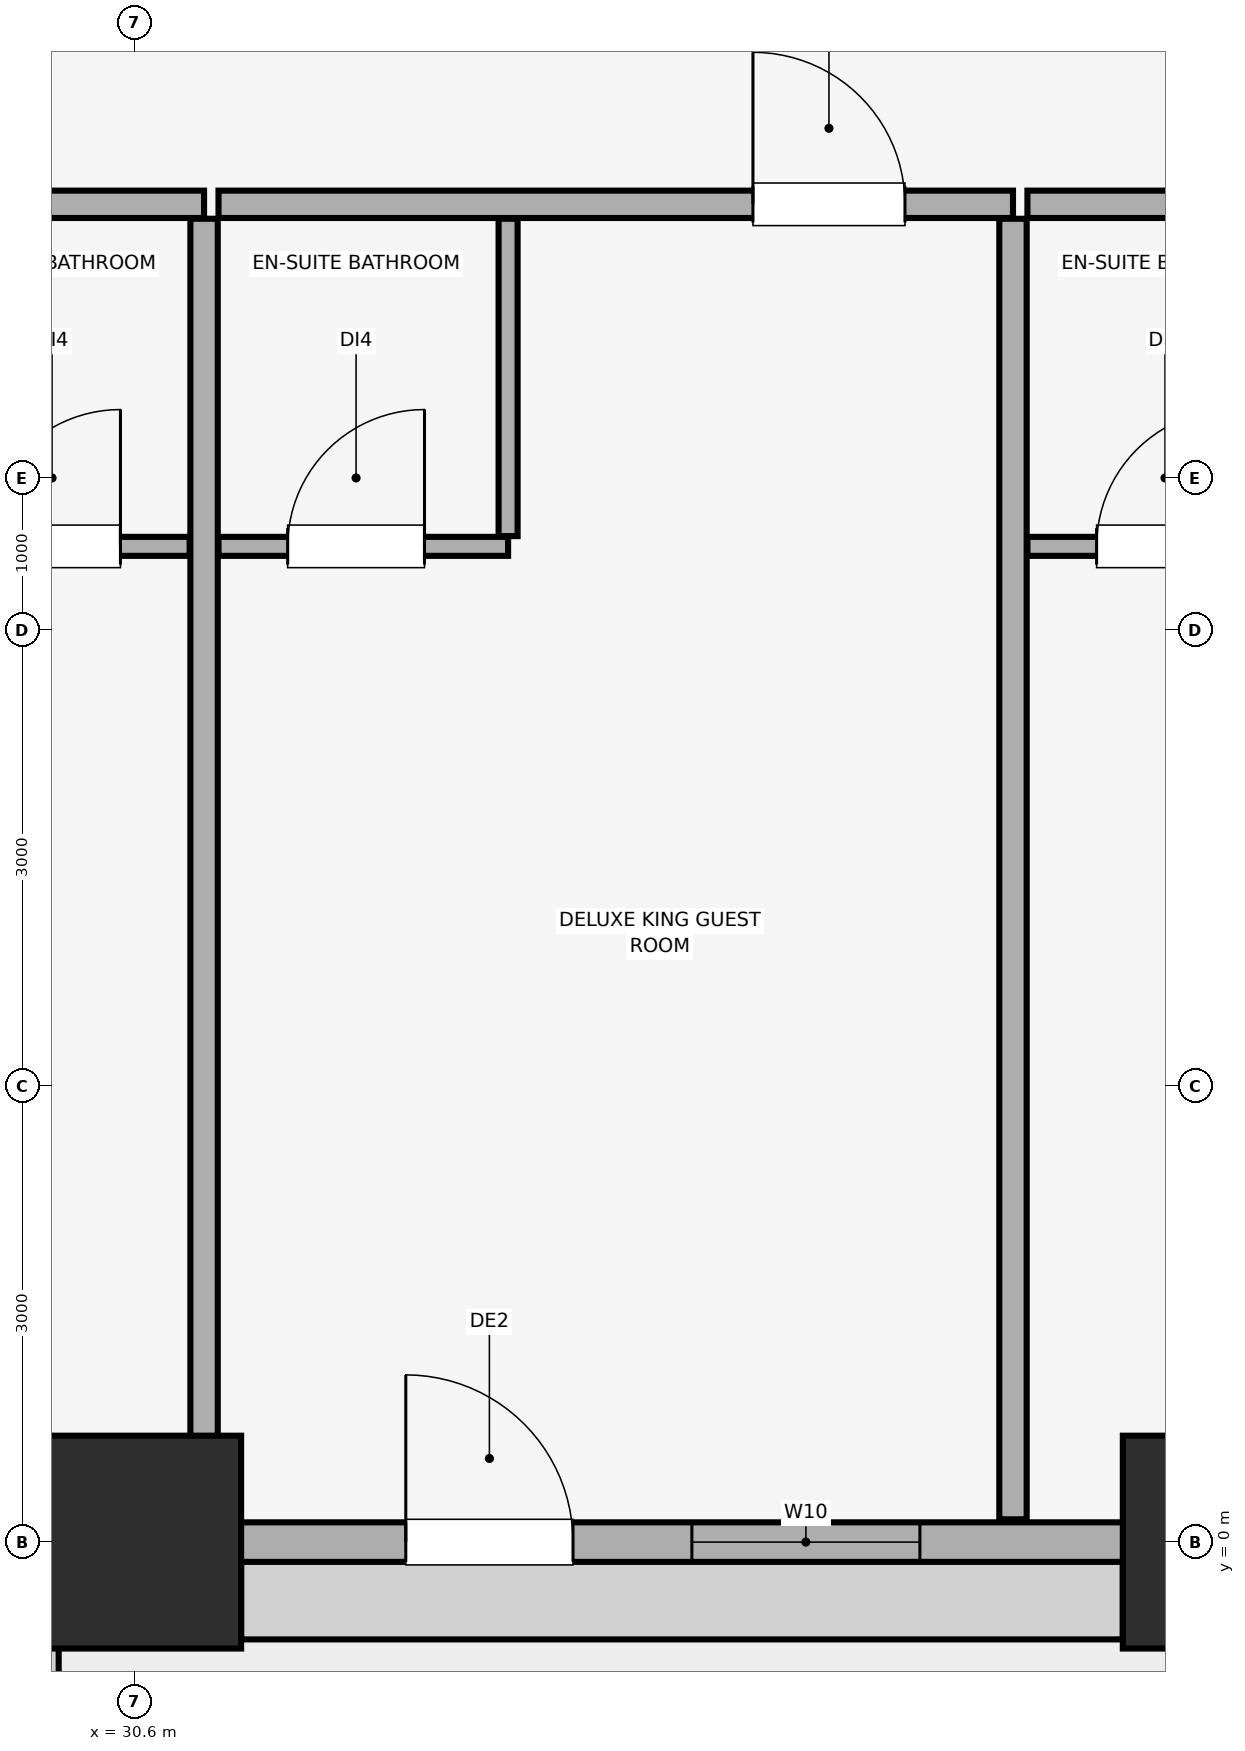
"""IFC4 building model, lengths in metres.
Left out: names, types, materials, properties, quantities, classifications, styles, units other than length and angle.
Written with IfcOpenShell. Run it as: python <this file> out.ifc"""

import sys

from ifc_helpers import new_model, si_unit, direction, frame, frame_2d, origin, origin_2d, place, context, subcontext, project, spatial, rectangle, extrude, element, fill, save


model = new_model("IFC4")
c1 = context("Model", 3, precision=1e-05, world=origin(), true_north=direction((0.0, 1.0)))
c2 = subcontext(c1, "Body", "Model", "MODEL_VIEW")
j1 = project(units=[si_unit("LENGTHUNIT", "METRE"), si_unit("PLANEANGLEUNIT", "RADIAN")], contexts=[c1])
p1 = place(None, origin())
s1 = spatial("IfcSite", under=j1, at=p1, CompositionType="ELEMENT")
p2 = place(p1, origin())
s2 = spatial("IfcBuilding", under=s1, at=p2, CompositionType="ELEMENT")
p3 = place(p2, frame((0.0, 0.0, 31.4)))
s3 = spatial("IfcBuildingStorey", under=s2, at=p3, CompositionType="ELEMENT", Elevation=31.4)
for number, where, z_axis, x_axis in (
    (1, (30.6, 0.0, 0.0), (0.0, 0.0, 1.0), (1.0, 0.0, 0.0)),
    (2, (37.8, 0.0, 0.0), (0.0, 0.0, 1.0), (1.0, 0.0, 0.0)),
):
    element("IfcColumn", number, at=place(p3, frame(where, z_axis=z_axis, x_axis=x_axis)), inside=s3, PredefinedType="COLUMN", context=c2, shape_type="SweptSolid", body=[
        extrude(rectangle(XDim=1.4, YDim=1.4, at=origin_2d()), origin(), (0.0, 0.0, 1.0), 3.51),
    ])
p4 = place(p3, frame((4.2, 0.0, 0.0), z_axis=(0.0, 0.0, 1.0), x_axis=(1.0, 0.0, 0.0)))
e3 = element("IfcWall", 3, at=p4, inside=s3, PredefinedType="SOLIDWALL", context=c2, shape_type="SweptSolid", body=[
    extrude(rectangle(XDim=75.6, YDim=0.26, at=frame_2d((37.8, 0.0))), origin(), (0.0, 0.0, 1.0), 2.56),
])
p5 = place(p4, frame((13.517, 0.0, 0.0)))
e4 = element("IfcOpeningElement", 4, at=p5, cuts=e3, PredefinedType="OPENING", context=c2, shape_type="SweptSolid", body=[
    extrude(rectangle(XDim=1.1, YDim=2.15, at=frame_2d((0.55, 1.075))), frame((0.0, 0.14, 0.0), z_axis=(0.0, -1.0, 0.0), x_axis=(1.0, 0.0, 0.0)), (0.0, 0.0, 1.0), 0.28),
])
p6 = place(p4, frame((28.183, 0.0, 0.0)))
e5 = element("IfcOpeningElement", 5, at=p6, cuts=e3, PredefinedType="OPENING", context=c2, shape_type="SweptSolid", body=[
    extrude(rectangle(XDim=1.1, YDim=2.15, at=frame_2d((0.55, 1.075))), frame((0.0, 0.14, 0.0), z_axis=(0.0, -1.0, 0.0), x_axis=(1.0, 0.0, 0.0)), (0.0, 0.0, 1.0), 0.28),
])
p7 = place(p4, frame((60.983, 0.0, 0.0)))
e6 = element("IfcOpeningElement", 6, at=p7, cuts=e3, PredefinedType="OPENING", context=c2, shape_type="SweptSolid", body=[
    extrude(rectangle(XDim=1.1, YDim=2.15, at=frame_2d((0.55, 1.075))), frame((0.0, 0.14, 0.0), z_axis=(0.0, -1.0, 0.0), x_axis=(1.0, 0.0, 0.0)), (0.0, 0.0, 1.0), 0.28),
])
p8 = place(p4, frame((1.035, 0.0, 0.85)))
e7 = element("IfcOpeningElement", 7, at=p8, cuts=e3, PredefinedType="OPENING", context=c2, shape_type="SweptSolid", body=[
    extrude(rectangle(XDim=2.4, YDim=1.5, at=frame_2d((1.2, 0.75))), frame((0.0, 0.14, 0.0), z_axis=(0.0, -1.0, 0.0), x_axis=(1.0, 0.0, 0.0)), (0.0, 0.0, 1.0), 0.28),
])
p9 = place(p4, frame((7.031, 0.0, 0.85)))
e8 = element("IfcOpeningElement", 8, at=p9, cuts=e3, PredefinedType="OPENING", context=c2, shape_type="SweptSolid", body=[
    extrude(rectangle(XDim=2.4, YDim=1.5, at=frame_2d((1.2, 0.75))), frame((0.0, 0.14, 0.0), z_axis=(0.0, -1.0, 0.0), x_axis=(1.0, 0.0, 0.0)), (0.0, 0.0, 1.0), 0.28),
])
p10 = place(p4, frame((16.757, 0.0, 0.85)))
e9 = element("IfcOpeningElement", 9, at=p10, cuts=e3, PredefinedType="OPENING", context=c2, shape_type="SweptSolid", body=[
    extrude(rectangle(XDim=1.5, YDim=1.4, at=frame_2d((0.75, 0.7))), frame((0.0, 0.14, 0.0), z_axis=(0.0, -1.0, 0.0), x_axis=(1.0, 0.0, 0.0)), (0.0, 0.0, 1.0), 0.28),
])
p11 = place(p4, frame((22.567, 0.0, 0.85)))
e10 = element("IfcOpeningElement", 10, at=p11, cuts=e3, PredefinedType="OPENING", context=c2, shape_type="SweptSolid", body=[
    extrude(rectangle(XDim=2.4, YDim=1.5, at=frame_2d((1.2, 0.75))), frame((0.0, 0.14, 0.0), z_axis=(0.0, -1.0, 0.0), x_axis=(1.0, 0.0, 0.0)), (0.0, 0.0, 1.0), 0.28),
])
p12 = place(p4, frame((30.065, 0.0, 0.85)))
e11 = element("IfcOpeningElement", 11, at=p12, cuts=e3, PredefinedType="OPENING", context=c2, shape_type="SweptSolid", body=[
    extrude(rectangle(XDim=1.5, YDim=1.4, at=frame_2d((0.75, 0.7))), frame((0.0, 0.14, 0.0), z_axis=(0.0, -1.0, 0.0), x_axis=(1.0, 0.0, 0.0)), (0.0, 0.0, 1.0), 0.28),
])
p13 = place(p4, frame((34.55, 0.0, 0.85)))
e12 = element("IfcOpeningElement", 12, at=p13, cuts=e3, PredefinedType="OPENING", context=c2, shape_type="SweptSolid", body=[
    extrude(rectangle(XDim=2.4, YDim=1.5, at=frame_2d((1.2, 0.75))), frame((0.0, 0.14, 0.0), z_axis=(0.0, -1.0, 0.0), x_axis=(1.0, 0.0, 0.0)), (0.0, 0.0, 1.0), 0.28),
])
p14 = place(p4, frame((38.35, 0.0, 0.85)))
e13 = element("IfcOpeningElement", 13, at=p14, cuts=e3, PredefinedType="OPENING", context=c2, shape_type="SweptSolid", body=[
    extrude(rectangle(XDim=2.4, YDim=1.5, at=frame_2d((1.2, 0.75))), frame((0.0, 0.14, 0.0), z_axis=(0.0, -1.0, 0.0), x_axis=(1.0, 0.0, 0.0)), (0.0, 0.0, 1.0), 0.28),
])
p15 = place(p4, frame((44.281, 0.0, 0.85)))
e14 = element("IfcOpeningElement", 14, at=p15, cuts=e3, PredefinedType="OPENING", context=c2, shape_type="SweptSolid", body=[
    extrude(rectangle(XDim=2.4, YDim=1.5, at=frame_2d((1.2, 0.75))), frame((0.0, 0.14, 0.0), z_axis=(0.0, -1.0, 0.0), x_axis=(1.0, 0.0, 0.0)), (0.0, 0.0, 1.0), 0.28),
])
p16 = place(p4, frame((50.332, 0.0, 0.85)))
e15 = element("IfcOpeningElement", 15, at=p16, cuts=e3, PredefinedType="OPENING", context=c2, shape_type="SweptSolid", body=[
    extrude(rectangle(XDim=2.4, YDim=1.5, at=frame_2d((1.2, 0.75))), frame((0.0, 0.14, 0.0), z_axis=(0.0, -1.0, 0.0), x_axis=(1.0, 0.0, 0.0)), (0.0, 0.0, 1.0), 0.28),
])
p17 = place(p4, frame((53.981, 0.0, 0.85)))
e16 = element("IfcOpeningElement", 16, at=p17, cuts=e3, PredefinedType="OPENING", context=c2, shape_type="SweptSolid", body=[
    extrude(rectangle(XDim=1.5, YDim=1.4, at=frame_2d((0.75, 0.7))), frame((0.0, 0.14, 0.0), z_axis=(0.0, -1.0, 0.0), x_axis=(1.0, 0.0, 0.0)), (0.0, 0.0, 1.0), 0.28),
])
p18 = place(p4, frame((64.759, 0.0, 0.85)))
e17 = element("IfcOpeningElement", 17, at=p18, cuts=e3, PredefinedType="OPENING", context=c2, shape_type="SweptSolid", body=[
    extrude(rectangle(XDim=1.5, YDim=1.4, at=frame_2d((0.75, 0.7))), frame((0.0, 0.14, 0.0), z_axis=(0.0, -1.0, 0.0), x_axis=(1.0, 0.0, 0.0)), (0.0, 0.0, 1.0), 0.28),
])
p19 = place(p4, frame((67.509, 0.0, 0.85)))
e18 = element("IfcOpeningElement", 18, at=p19, cuts=e3, PredefinedType="OPENING", context=c2, shape_type="SweptSolid", body=[
    extrude(rectangle(XDim=2.4, YDim=1.5, at=frame_2d((1.2, 0.75))), frame((0.0, 0.14, 0.0), z_axis=(0.0, -1.0, 0.0), x_axis=(1.0, 0.0, 0.0)), (0.0, 0.0, 1.0), 0.28),
])
p20 = place(p4, frame((72.165, 0.0, 0.85)))
e19 = element("IfcOpeningElement", 19, at=p20, cuts=e3, PredefinedType="OPENING", context=c2, shape_type="SweptSolid", body=[
    extrude(rectangle(XDim=2.4, YDim=1.5, at=frame_2d((1.2, 0.75))), frame((0.0, 0.14, 0.0), z_axis=(0.0, -1.0, 0.0), x_axis=(1.0, 0.0, 0.0)), (0.0, 0.0, 1.0), 0.28),
])
p21 = place(p3, frame((25.83, 8.8, 0.0), z_axis=(0.0, 0.0, 1.0), x_axis=(1.0, 0.0, 0.0)))
e20 = element("IfcWall", 20, at=p21, inside=s3, PredefinedType="PARTITIONING", context=c2, shape_type="SweptSolid", body=[
    extrude(rectangle(XDim=5.226, YDim=0.18, at=frame_2d((2.613, 0.0))), origin(), (0.0, 0.0, 1.0), 3.51),
])
p22 = place(p21, frame((0.65, 0.0, 0.0)))
e21 = element("IfcOpeningElement", 21, at=p22, cuts=e20, PredefinedType="OPENING", context=c2, shape_type="SweptSolid", body=[
    extrude(rectangle(XDim=1.0, YDim=2.15, at=frame_2d((0.5, 1.075))), frame((0.0, 0.1, 0.0), z_axis=(0.0, -1.0, 0.0), x_axis=(1.0, 0.0, 0.0)), (0.0, 0.0, 1.0), 0.2),
])
p23 = place(p3, frame((31.056, 0.15, 0.0), z_axis=(0.0, 0.0, 1.0), x_axis=(0.0, 1.0, 0.0)))
e22 = element("IfcWall", 22, at=p23, inside=s3, PredefinedType="PARTITIONING", context=c2, shape_type="SweptSolid", body=[
    extrude(rectangle(XDim=8.555, YDim=0.18, at=frame_2d((4.278, 0.0))), origin(), (0.0, 0.0, 1.0), 2.88),
])
p24 = place(p3, frame((29.056, 6.55, 0.0), z_axis=(0.0, 0.0, 1.0), x_axis=(1.0, 0.0, 0.0)))
e23 = element("IfcWall", 23, at=p24, inside=s3, PredefinedType="PARTITIONING", context=c2, shape_type="SweptSolid", body=[
    extrude(rectangle(XDim=1.905, YDim=0.125, at=frame_2d((0.952, 0.0))), origin(), (0.0, 0.0, 1.0), 3.51),
])
p25 = place(p24, frame((0.55, 0.0, 0.0)))
e24 = element("IfcOpeningElement", 24, at=p25, cuts=e23, PredefinedType="OPENING", context=c2, shape_type="SweptSolid", body=[
    extrude(rectangle(XDim=0.9, YDim=2.1, at=frame_2d((0.45, 1.05))), frame((0.0, 0.073, 0.0), z_axis=(0.0, -1.0, 0.0), x_axis=(1.0, 0.0, 0.0)), (0.0, 0.0, 1.0), 0.145),
])
p26 = place(p3, frame((31.151, 8.8, 0.0), z_axis=(0.0, 0.0, 1.0), x_axis=(1.0, 0.0, 0.0)))
e25 = element("IfcWall", 25, at=p26, inside=s3, PredefinedType="PARTITIONING", context=c2, shape_type="SweptSolid", body=[
    extrude(rectangle(XDim=5.226, YDim=0.18, at=frame_2d((2.613, 0.0))), origin(), (0.0, 0.0, 1.0), 3.51),
])
p27 = place(p26, frame((3.516, 0.0, 0.0)))
e26 = element("IfcOpeningElement", 26, at=p27, cuts=e25, PredefinedType="OPENING", context=c2, shape_type="SweptSolid", body=[
    extrude(rectangle(XDim=1.0, YDim=2.15, at=frame_2d((0.5, 1.075))), frame((0.0, 0.1, 0.0), z_axis=(0.0, -1.0, 0.0), x_axis=(1.0, 0.0, 0.0)), (0.0, 0.0, 1.0), 0.2),
])
p28 = place(p3, frame((36.377, 0.15, 0.0), z_axis=(0.0, 0.0, 1.0), x_axis=(0.0, 1.0, 0.0)))
e27 = element("IfcWall", 27, at=p28, inside=s3, PredefinedType="PARTITIONING", context=c2, shape_type="SweptSolid", body=[
    extrude(rectangle(XDim=8.555, YDim=0.18, at=frame_2d((4.278, 0.0))), origin(), (0.0, 0.0, 1.0), 3.51),
])
p29 = place(p3, frame((31.151, 6.55, 0.0), z_axis=(0.0, 0.0, 1.0), x_axis=(1.0, 0.0, 0.0)))
e28 = element("IfcWall", 28, at=p29, inside=s3, PredefinedType="PARTITIONING", context=c2, shape_type="SweptSolid", body=[
    extrude(rectangle(XDim=1.905, YDim=0.125, at=frame_2d((0.953, 0.0))), origin(), (0.0, 0.0, 1.0), 3.51),
])
p30 = place(p29, frame((0.455, 0.0, 0.0)))
e29 = element("IfcOpeningElement", 29, at=p30, cuts=e28, PredefinedType="OPENING", context=c2, shape_type="SweptSolid", body=[
    extrude(rectangle(XDim=0.9, YDim=2.1, at=frame_2d((0.45, 1.05))), frame((0.0, 0.073, 0.0), z_axis=(0.0, -1.0, 0.0), x_axis=(1.0, 0.0, 0.0)), (0.0, 0.0, 1.0), 0.145),
])
p31 = place(p3, frame((33.056, 6.617, 0.0), z_axis=(0.0, 0.0, 1.0), x_axis=(0.0, 1.0, 0.0)))
e30 = element("IfcWall", 30, at=p31, inside=s3, PredefinedType="PARTITIONING", context=c2, shape_type="SweptSolid", body=[
    extrude(rectangle(XDim=2.088, YDim=0.125, at=frame_2d((1.044, 0.0))), origin(), (0.0, 0.0, 1.0), 3.51),
])
p32 = place(p3, frame((36.472, 8.8, 0.0), z_axis=(0.0, 0.0, 1.0), x_axis=(1.0, 0.0, 0.0)))
e31 = element("IfcWall", 31, at=p32, inside=s3, PredefinedType="PARTITIONING", context=c2, shape_type="SweptSolid", body=[
    extrude(rectangle(XDim=5.226, YDim=0.18, at=frame_2d((2.613, 0.0))), origin(), (0.0, 0.0, 1.0), 3.51),
])
p33 = place(p32, frame((3.516, 0.0, 0.0)))
e32 = element("IfcOpeningElement", 32, at=p33, cuts=e31, PredefinedType="OPENING", context=c2, shape_type="SweptSolid", body=[
    extrude(rectangle(XDim=1.0, YDim=2.15, at=frame_2d((0.5, 1.075))), frame((0.0, 0.1, 0.0), z_axis=(0.0, -1.0, 0.0), x_axis=(1.0, 0.0, 0.0)), (0.0, 0.0, 1.0), 0.2),
])
p34 = place(p3, frame((36.472, 6.55, 0.0), z_axis=(0.0, 0.0, 1.0), x_axis=(1.0, 0.0, 0.0)))
e33 = element("IfcWall", 33, at=p34, inside=s3, PredefinedType="PARTITIONING", context=c2, shape_type="SweptSolid", body=[
    extrude(rectangle(XDim=1.905, YDim=0.125, at=frame_2d((0.953, 0.0))), origin(), (0.0, 0.0, 1.0), 3.51),
])
p35 = place(p34, frame((0.455, 0.0, 0.0)))
e34 = element("IfcOpeningElement", 34, at=p35, cuts=e33, PredefinedType="OPENING", context=c2, shape_type="SweptSolid", body=[
    extrude(rectangle(XDim=0.9, YDim=2.1, at=frame_2d((0.45, 1.05))), frame((0.0, 0.073, 0.0), z_axis=(0.0, -1.0, 0.0), x_axis=(1.0, 0.0, 0.0)), (0.0, 0.0, 1.0), 0.145),
])
p36 = place(p6, origin())
e35 = element("IfcDoor", 35, at=p36, inside=s3, OperationType="SINGLE_SWING_LEFT", PredefinedType="DOOR", context=c2, shape_type="SweptSolid", body=[
    extrude(rectangle(XDim=1.1, YDim=2.15, at=frame_2d((0.55, 1.075))), frame((0.0, 0.025, 0.0), z_axis=(0.0, -1.0, 0.0), x_axis=(1.0, 0.0, 0.0)), (0.0, 0.0, 1.0), 0.05),
])
fill(e5, e35)
p37 = place(p12, origin())
e36 = element("IfcWindow", 36, at=p37, inside=s3, PartitioningType="SINGLE_PANEL", PredefinedType="WINDOW", context=c2, shape_type="SweptSolid", body=[
    extrude(rectangle(XDim=1.5, YDim=1.4, at=frame_2d((0.75, 0.7))), frame((0.0, 0.03, 0.0), z_axis=(0.0, -1.0, 0.0), x_axis=(1.0, 0.0, 0.0)), (0.0, 0.0, 1.0), 0.06),
])
fill(e11, e36)
p38 = place(p25, origin())
e37 = element("IfcDoor", 37, at=p38, inside=s3, OperationType="SINGLE_SWING_RIGHT", PredefinedType="DOOR", context=c2, shape_type="SweptSolid", body=[
    extrude(rectangle(XDim=0.9, YDim=2.1, at=frame_2d((0.45, 1.05))), frame((0.0, 0.025, 0.0), z_axis=(0.0, -1.0, 0.0), x_axis=(1.0, 0.0, 0.0)), (0.0, 0.0, 1.0), 0.05),
])
fill(e24, e37)
p39 = place(p27, origin())
e38 = element("IfcDoor", 38, at=p39, inside=s3, OperationType="SINGLE_SWING_LEFT", PredefinedType="DOOR", context=c2, shape_type="SweptSolid", body=[
    extrude(rectangle(XDim=1.0, YDim=2.15, at=frame_2d((0.5, 1.075))), frame((0.0, 0.025, 0.0), z_axis=(0.0, -1.0, 0.0), x_axis=(1.0, 0.0, 0.0)), (0.0, 0.0, 1.0), 0.05),
])
fill(e26, e38)
p40 = place(p30, origin())
e39 = element("IfcDoor", 39, at=p40, inside=s3, OperationType="SINGLE_SWING_RIGHT", PredefinedType="DOOR", context=c2, shape_type="SweptSolid", body=[
    extrude(rectangle(XDim=0.9, YDim=2.1, at=frame_2d((0.45, 1.05))), frame((0.0, 0.025, 0.0), z_axis=(0.0, -1.0, 0.0), x_axis=(1.0, 0.0, 0.0)), (0.0, 0.0, 1.0), 0.05),
])
fill(e29, e39)
p41 = place(p35, origin())
e40 = element("IfcDoor", 40, at=p41, inside=s3, OperationType="SINGLE_SWING_RIGHT", PredefinedType="DOOR", context=c2, shape_type="SweptSolid", body=[
    extrude(rectangle(XDim=0.9, YDim=2.1, at=frame_2d((0.45, 1.05))), frame((0.0, 0.025, 0.0), z_axis=(0.0, -1.0, 0.0), x_axis=(1.0, 0.0, 0.0)), (0.0, 0.0, 1.0), 0.05),
])
fill(e34, e40)
save(model, sys.argv[1])
